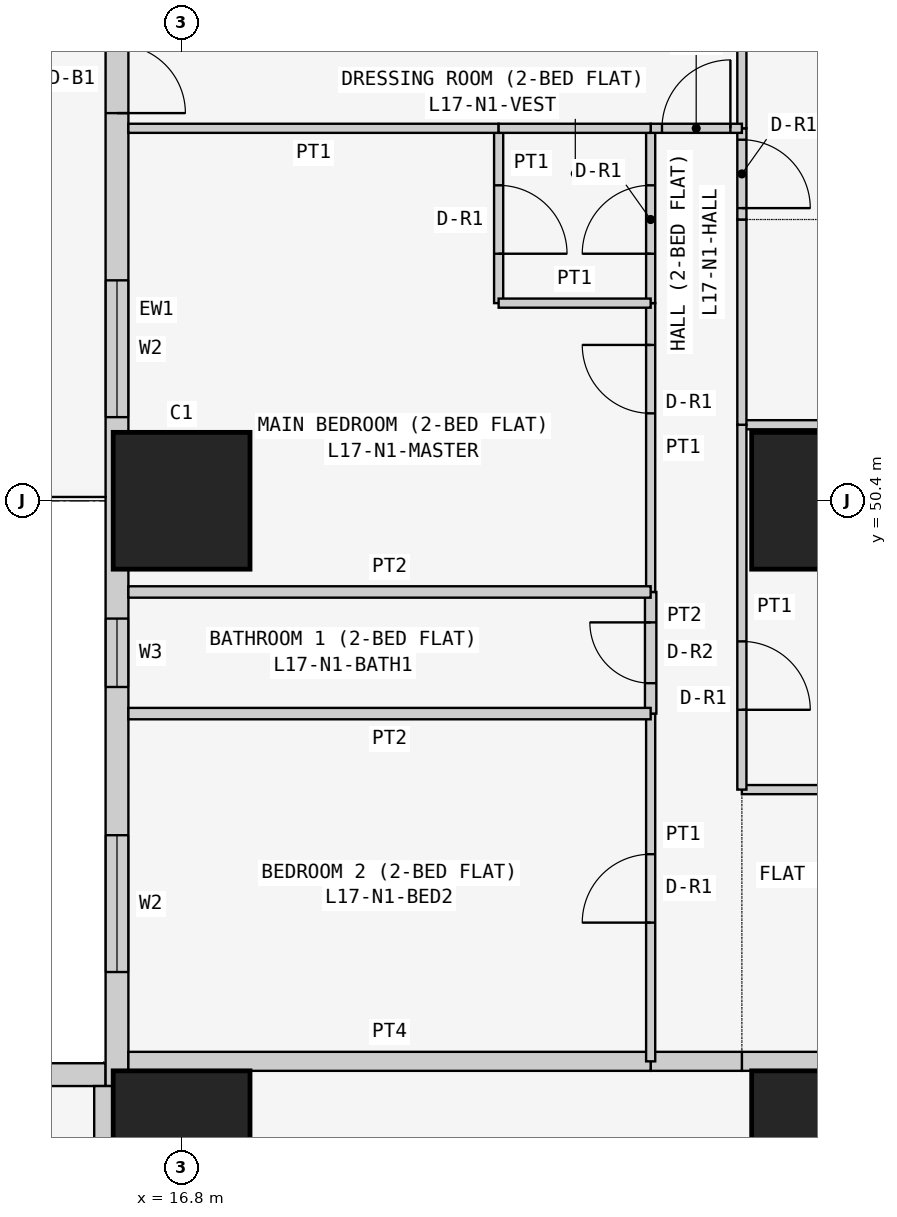
"""IFC4 building model, lengths in metres.
Left out: names, types, materials, properties, quantities, classifications, styles, units other than length and angle.
Written with IfcOpenShell. Run it as: python <this file> out.ifc"""

import sys

from ifc_helpers import new_model, si_unit, direction, frame, frame_2d, origin, origin_2d, place, context, subcontext, project, spatial, rectangle, extrude, element, fill, save


model = new_model("IFC4")
c1 = context("Model", 3, precision=1e-05, world=origin(), true_north=direction((0.0, 1.0)))
c2 = subcontext(c1, "Body", "Model", "MODEL_VIEW")
j1 = project(units=[si_unit("LENGTHUNIT", "METRE"), si_unit("PLANEANGLEUNIT", "RADIAN")], contexts=[c1])
p1 = place(None, origin())
s1 = spatial("IfcSite", under=j1, at=p1, CompositionType="ELEMENT")
p2 = place(p1, origin())
s2 = spatial("IfcBuilding", under=s1, at=p2, CompositionType="ELEMENT")
p3 = place(p2, frame((0.0, 0.0, 70.5)))
s3 = spatial("IfcBuildingStorey", under=s2, at=p3, CompositionType="ELEMENT", Elevation=70.5)
for number, where, z_axis, x_axis in (
    (1, (16.8, 42.0, 0.0), (0.0, 0.0, 1.0), (1.0, 0.0, 0.0)),
    (2, (16.8, 50.4, 0.0), (0.0, 0.0, 1.0), (1.0, 0.0, 0.0)),
    (3, (25.2, 42.0, 0.0), (0.0, 0.0, 1.0), (1.0, 0.0, 0.0)),
    (4, (25.2, 50.4, 0.0), (0.0, 0.0, 1.0), (1.0, 0.0, 0.0)),
):
    element("IfcColumn", number, at=place(p3, frame(where, z_axis=z_axis, x_axis=x_axis)), inside=s3, PredefinedType="COLUMN", context=c2, shape_type="SweptSolid", body=[
        extrude(rectangle(XDim=1.8, YDim=1.8, at=origin_2d()), origin(), (0.0, 0.0, 1.0), 3.6),
    ])
p4 = place(p3, frame((15.8, 42.85, 0.0), z_axis=(0.0, 0.0, 1.0), x_axis=(-1.0, 0.0, 0.0)))
e5 = element("IfcWall", 5, at=p4, inside=s3, PredefinedType="SOLIDWALL", context=c2, shape_type="SweptSolid", body=[
    extrude(rectangle(XDim=15.4, YDim=0.3, at=frame_2d((7.7, 0.0))), origin(), (0.0, 0.0, 1.0), 3.45),
])
p5 = place(p4, frame((1.2, 0.0, 0.9)))
e6 = element("IfcOpeningElement", 6, at=p5, cuts=e5, PredefinedType="OPENING", context=c2, shape_type="SweptSolid", body=[
    extrude(rectangle(XDim=1.8, YDim=1.5, at=frame_2d((0.9, 0.75))), frame((0.0, 0.16, 0.0), z_axis=(0.0, -1.0, 0.0), x_axis=(1.0, 0.0, 0.0)), (0.0, 0.0, 1.0), 0.32),
])
p6 = place(p4, frame((4.95, 0.0, 1.5)))
e7 = element("IfcOpeningElement", 7, at=p6, cuts=e5, PredefinedType="OPENING", context=c2, shape_type="SweptSolid", body=[
    extrude(rectangle(XDim=0.9, YDim=0.7, at=frame_2d((0.45, 0.35))), frame((0.0, 0.16, 0.0), z_axis=(0.0, -1.0, 0.0), x_axis=(1.0, 0.0, 0.0)), (0.0, 0.0, 1.0), 0.32),
])
p7 = place(p4, frame((8.5, 0.0, 0.9)))
e8 = element("IfcOpeningElement", 8, at=p7, cuts=e5, PredefinedType="OPENING", context=c2, shape_type="SweptSolid", body=[
    extrude(rectangle(XDim=1.8, YDim=1.5, at=frame_2d((0.9, 0.75))), frame((0.0, 0.16, 0.0), z_axis=(0.0, -1.0, 0.0), x_axis=(1.0, 0.0, 0.0)), (0.0, 0.0, 1.0), 0.32),
])
p8 = place(p4, frame((12.5, 0.0, 0.0)))
e9 = element("IfcOpeningElement", 9, at=p8, cuts=e5, PredefinedType="OPENING", context=c2, shape_type="SweptSolid", body=[
    extrude(rectangle(XDim=0.9, YDim=2.4, at=frame_2d((0.45, 1.2))), frame((0.0, 0.16, 0.0), z_axis=(0.0, -1.0, 0.0), x_axis=(1.0, 0.0, 0.0)), (0.0, 0.0, 1.0), 0.32),
])
p9 = place(p4, frame((13.5, 0.0, 0.9)))
e10 = element("IfcOpeningElement", 10, at=p9, cuts=e5, PredefinedType="OPENING", context=c2, shape_type="SweptSolid", body=[
    extrude(rectangle(XDim=1.2, YDim=1.5, at=frame_2d((0.6, 0.75))), frame((0.0, 0.16, 0.0), z_axis=(0.0, -1.0, 0.0), x_axis=(1.0, 0.0, 0.0)), (0.0, 0.0, 1.0), 0.32),
])
p10 = place(p3, frame((15.95, 58.4, 0.0), z_axis=(0.0, 0.0, 1.0), x_axis=(0.0, -1.0, 0.0)))
e11 = element("IfcWall", 11, at=p10, inside=s3, PredefinedType="SOLIDWALL", context=c2, shape_type="SweptSolid", body=[
    extrude(rectangle(XDim=15.7, YDim=0.3, at=frame_2d((7.85, 0.0))), origin(), (0.0, 0.0, 1.0), 3.45),
])
p11 = place(p10, frame((12.4, 0.0, 0.9)))
e12 = element("IfcOpeningElement", 12, at=p11, cuts=e11, PredefinedType="OPENING", context=c2, shape_type="SweptSolid", body=[
    extrude(rectangle(XDim=1.8, YDim=1.5, at=frame_2d((0.9, 0.75))), frame((0.0, 0.16, 0.0), z_axis=(0.0, -1.0, 0.0), x_axis=(1.0, 0.0, 0.0)), (0.0, 0.0, 1.0), 0.32),
])
p12 = place(p10, frame((9.55, 0.0, 1.5)))
e13 = element("IfcOpeningElement", 13, at=p12, cuts=e11, PredefinedType="OPENING", context=c2, shape_type="SweptSolid", body=[
    extrude(rectangle(XDim=0.9, YDim=0.7, at=frame_2d((0.45, 0.35))), frame((0.0, 0.16, 0.0), z_axis=(0.0, -1.0, 0.0), x_axis=(1.0, 0.0, 0.0)), (0.0, 0.0, 1.0), 0.32),
])
p13 = place(p10, frame((5.1, 0.0, 0.9)))
e14 = element("IfcOpeningElement", 14, at=p13, cuts=e11, PredefinedType="OPENING", context=c2, shape_type="SweptSolid", body=[
    extrude(rectangle(XDim=1.8, YDim=1.5, at=frame_2d((0.9, 0.75))), frame((0.0, 0.16, 0.0), z_axis=(0.0, -1.0, 0.0), x_axis=(1.0, 0.0, 0.0)), (0.0, 0.0, 1.0), 0.32),
])
p14 = place(p10, frame((2.0, 0.0, 0.0)))
e15 = element("IfcOpeningElement", 15, at=p14, cuts=e11, PredefinedType="OPENING", context=c2, shape_type="SweptSolid", body=[
    extrude(rectangle(XDim=0.9, YDim=2.4, at=frame_2d((0.45, 1.2))), frame((0.0, 0.16, 0.0), z_axis=(0.0, -1.0, 0.0), x_axis=(1.0, 0.0, 0.0)), (0.0, 0.0, 1.0), 0.32),
])
p15 = place(p10, frame((0.7, 0.0, 0.9)))
e16 = element("IfcOpeningElement", 16, at=p15, cuts=e11, PredefinedType="OPENING", context=c2, shape_type="SweptSolid", body=[
    extrude(rectangle(XDim=1.2, YDim=1.5, at=frame_2d((0.6, 0.75))), frame((0.0, 0.16, 0.0), z_axis=(0.0, -1.0, 0.0), x_axis=(1.0, 0.0, 0.0)), (0.0, 0.0, 1.0), 0.32),
])
p16 = place(p3, frame((24.171, 43.025, 0.0), z_axis=(0.0, 0.0, 1.0), x_axis=(1.0, 0.0, 0.0)))
e17 = element("IfcWall", 17, at=p16, inside=s3, PredefinedType="PARTITIONING", context=c2, shape_type="SweptSolid", body=[
    extrude(rectangle(XDim=5.229, YDim=0.25, at=frame_2d((2.615, 0.0))), origin(), (0.0, 0.0, 1.0), 3.45),
])
p17 = place(p16, frame((2.129, 0.0, 0.0)))
e18 = element("IfcOpeningElement", 18, at=p17, cuts=e17, PredefinedType="OPENING", context=c2, shape_type="SweptSolid", body=[
    extrude(rectangle(XDim=1.0, YDim=2.1, at=frame_2d((0.5, 1.05))), frame((0.0, 0.135, 0.0), z_axis=(0.0, -1.0, 0.0), x_axis=(1.0, 0.0, 0.0)), (0.0, 0.0, 1.0), 0.27),
])
p18 = place(p3, frame((22.971, 43.025, 0.0), z_axis=(0.0, 0.0, 1.0), x_axis=(1.0, 0.0, 0.0)))
e19 = element("IfcWall", 19, at=p18, inside=s3, PredefinedType="PARTITIONING", context=c2, shape_type="SweptSolid", body=[
    extrude(rectangle(XDim=1.2, YDim=0.25, at=frame_2d((0.6, 0.0))), origin(), (0.0, 0.0, 1.0), 3.45),
])
p19 = place(p3, frame((16.1, 43.025, 0.0), z_axis=(0.0, 0.0, 1.0), x_axis=(1.0, 0.0, 0.0)))
e20 = element("IfcWall", 20, at=p19, inside=s3, PredefinedType="PARTITIONING", context=c2, shape_type="SweptSolid", body=[
    extrude(rectangle(XDim=6.871, YDim=0.25, at=frame_2d((3.436, 0.0))), origin(), (0.0, 0.0, 1.0), 3.45),
])
p20 = place(p3, frame((15.775, 36.229, 0.0), z_axis=(0.0, 0.0, 1.0), x_axis=(0.0, 1.0, 0.0)))
e21 = element("IfcWall", 21, at=p20, inside=s3, PredefinedType="PARTITIONING", context=c2, shape_type="SweptSolid", body=[
    extrude(rectangle(XDim=6.471, YDim=0.25, at=frame_2d((3.235, 0.0))), origin(), (0.0, 0.0, 1.0), 3.45),
])
for number, where, z_axis, x_axis in (
    (22, (29.4, 46.6, 0.0), (0.0, 0.0, 1.0), (-1.0, 0.0, 0.0)),
    (23, (29.4, 51.4, 0.0), (0.0, 0.0, 1.0), (-1.0, 0.0, 0.0)),
):
    element("IfcWall", number, at=place(p3, frame(where, z_axis=z_axis, x_axis=x_axis)), inside=s3, PredefinedType="PARTITIONING", context=c2, shape_type="SweptSolid", body=[
        extrude(rectangle(XDim=5.229, YDim=0.12, at=frame_2d((2.615, 0.0))), origin(), (0.0, 0.0, 1.0), 3.45),
    ])
p21 = place(p3, frame((24.171, 51.4, 0.0), z_axis=(0.0, 0.0, 1.0), x_axis=(0.0, -1.0, 0.0)))
e24 = element("IfcWall", 24, at=p21, inside=s3, PredefinedType="PARTITIONING", context=c2, shape_type="SweptSolid", body=[
    extrude(rectangle(XDim=4.8, YDim=0.12, at=frame_2d((2.4, 0.0))), origin(), (0.0, 0.0, 1.0), 3.45),
])
p22 = place(p21, frame((2.85, 0.0, 0.0)))
e25 = element("IfcOpeningElement", 25, at=p22, cuts=e24, PredefinedType="OPENING", context=c2, shape_type="SweptSolid", body=[
    extrude(rectangle(XDim=0.9, YDim=2.1, at=frame_2d((0.45, 1.05))), frame((0.0, 0.07, 0.0), z_axis=(0.0, -1.0, 0.0), x_axis=(1.0, 0.0, 0.0)), (0.0, 0.0, 1.0), 0.14),
])
p23 = place(p3, frame((24.171, 54.1, 0.0), z_axis=(0.0, 0.0, 1.0), x_axis=(0.0, -1.0, 0.0)))
e26 = element("IfcWall", 26, at=p23, inside=s3, PredefinedType="PARTITIONING", context=c2, shape_type="SweptSolid", body=[
    extrude(rectangle(XDim=2.7, YDim=0.12, at=frame_2d((1.35, 0.0))), origin(), (0.0, 0.0, 1.0), 3.45),
])
p24 = place(p3, frame((24.171, 55.3, 0.0), z_axis=(0.0, 0.0, 1.0), x_axis=(0.0, -1.0, 0.0)))
e27 = element("IfcWall", 27, at=p24, inside=s3, PredefinedType="PARTITIONING", context=c2, shape_type="SweptSolid", body=[
    extrude(rectangle(XDim=1.2, YDim=0.12, at=frame_2d((0.6, 0.0))), origin(), (0.0, 0.0, 1.0), 3.45),
])
p25 = place(p24, frame((0.15, 0.0, 0.0)))
e28 = element("IfcOpeningElement", 28, at=p25, cuts=e27, PredefinedType="OPENING", context=c2, shape_type="SweptSolid", body=[
    extrude(rectangle(XDim=0.9, YDim=2.1, at=frame_2d((0.45, 1.05))), frame((0.0, 0.07, 0.0), z_axis=(0.0, -1.0, 0.0), x_axis=(1.0, 0.0, 0.0)), (0.0, 0.0, 1.0), 0.14),
])
p26 = place(p3, frame((24.171, 59.45, 0.0), z_axis=(0.0, 0.0, 1.0), x_axis=(0.0, -1.0, 0.0)))
e29 = element("IfcWall", 29, at=p26, inside=s3, PredefinedType="PARTITIONING", context=c2, shape_type="SweptSolid", body=[
    extrude(rectangle(XDim=4.15, YDim=0.12, at=frame_2d((2.075, 0.0))), origin(), (0.0, 0.0, 1.0), 3.45),
])
p27 = place(p3, frame((22.971, 47.6, 0.0), z_axis=(0.0, 0.0, 1.0), x_axis=(0.0, -1.0, 0.0)))
e30 = element("IfcWall", 30, at=p27, inside=s3, PredefinedType="PARTITIONING", context=c2, shape_type="SweptSolid", body=[
    extrude(rectangle(XDim=4.575, YDim=0.12, at=frame_2d((2.288, 0.0))), origin(), (0.0, 0.0, 1.0), 3.45),
])
p28 = place(p27, frame((1.85, 0.0, 0.0)))
e31 = element("IfcOpeningElement", 31, at=p28, cuts=e30, PredefinedType="OPENING", context=c2, shape_type="SweptSolid", body=[
    extrude(rectangle(XDim=0.9, YDim=2.1, at=frame_2d((0.45, 1.05))), frame((0.0, 0.07, 0.0), z_axis=(0.0, -1.0, 0.0), x_axis=(1.0, 0.0, 0.0)), (0.0, 0.0, 1.0), 0.14),
])
p29 = place(p3, frame((22.971, 49.2, 0.0), z_axis=(0.0, 0.0, 1.0), x_axis=(0.0, -1.0, 0.0)))
e32 = element("IfcWall", 32, at=p29, inside=s3, PredefinedType="PARTITIONING", context=c2, shape_type="SweptSolid", body=[
    extrude(rectangle(XDim=1.6, YDim=0.15, at=frame_2d((0.8, 0.0))), origin(), (0.0, 0.0, 1.0), 3.45),
])
p30 = place(p29, frame((0.4, 0.0, 0.0)))
e33 = element("IfcOpeningElement", 33, at=p30, cuts=e32, PredefinedType="OPENING", context=c2, shape_type="SweptSolid", body=[
    extrude(rectangle(XDim=0.8, YDim=2.1, at=frame_2d((0.4, 1.05))), frame((0.0, 0.085, 0.0), z_axis=(0.0, -1.0, 0.0), x_axis=(1.0, 0.0, 0.0)), (0.0, 0.0, 1.0), 0.17),
])
p31 = place(p3, frame((22.971, 53.0, 0.0), z_axis=(0.0, 0.0, 1.0), x_axis=(0.0, -1.0, 0.0)))
e34 = element("IfcWall", 34, at=p31, inside=s3, PredefinedType="PARTITIONING", context=c2, shape_type="SweptSolid", body=[
    extrude(rectangle(XDim=3.8, YDim=0.12, at=frame_2d((1.9, 0.0))), origin(), (0.0, 0.0, 1.0), 3.45),
])
p32 = place(p31, frame((0.55, 0.0, 0.0)))
e35 = element("IfcOpeningElement", 35, at=p32, cuts=e34, PredefinedType="OPENING", context=c2, shape_type="SweptSolid", body=[
    extrude(rectangle(XDim=0.9, YDim=2.1, at=frame_2d((0.45, 1.05))), frame((0.0, 0.07, 0.0), z_axis=(0.0, -1.0, 0.0), x_axis=(1.0, 0.0, 0.0)), (0.0, 0.0, 1.0), 0.14),
])
p33 = place(p3, frame((22.971, 55.3, 0.0), z_axis=(0.0, 0.0, 1.0), x_axis=(0.0, -1.0, 0.0)))
e36 = element("IfcWall", 36, at=p33, inside=s3, PredefinedType="PARTITIONING", context=c2, shape_type="SweptSolid", body=[
    extrude(rectangle(XDim=2.3, YDim=0.12, at=frame_2d((1.15, 0.0))), origin(), (0.0, 0.0, 1.0), 3.45),
])
p34 = place(p33, frame((0.75, 0.0, 0.0)))
e37 = element("IfcOpeningElement", 37, at=p34, cuts=e36, PredefinedType="OPENING", context=c2, shape_type="SweptSolid", body=[
    extrude(rectangle(XDim=0.9, YDim=2.1, at=frame_2d((0.45, 1.05))), frame((0.0, 0.07, 0.0), z_axis=(0.0, -1.0, 0.0), x_axis=(1.0, 0.0, 0.0)), (0.0, 0.0, 1.0), 0.14),
])
p35 = place(p3, frame((24.171, 55.3, 0.0), z_axis=(0.0, 0.0, 1.0), x_axis=(-1.0, 0.0, 0.0)))
e38 = element("IfcWall", 38, at=p35, inside=s3, PredefinedType="PARTITIONING", context=c2, shape_type="SweptSolid", body=[
    extrude(rectangle(XDim=1.2, YDim=0.12, at=frame_2d((0.6, 0.0))), origin(), (0.0, 0.0, 1.0), 3.45),
])
p36 = place(p35, frame((0.151, 0.0, 0.0)))
e39 = element("IfcOpeningElement", 39, at=p36, cuts=e38, PredefinedType="OPENING", context=c2, shape_type="SweptSolid", body=[
    extrude(rectangle(XDim=0.9, YDim=2.1, at=frame_2d((0.45, 1.05))), frame((0.0, 0.07, 0.0), z_axis=(0.0, -1.0, 0.0), x_axis=(1.0, 0.0, 0.0)), (0.0, 0.0, 1.0), 0.14),
])
for number, where, z_axis, x_axis in (
    (40, (22.971, 47.6, 0.0), (0.0, 0.0, 1.0), (-1.0, 0.0, 0.0)),
    (41, (22.971, 49.2, 0.0), (0.0, 0.0, 1.0), (-1.0, 0.0, 0.0)),
):
    element("IfcWall", number, at=place(p3, frame(where, z_axis=z_axis, x_axis=x_axis)), inside=s3, PredefinedType="PARTITIONING", context=c2, shape_type="SweptSolid", body=[
        extrude(rectangle(XDim=6.871, YDim=0.15, at=frame_2d((3.436, 0.0))), origin(), (0.0, 0.0, 1.0), 3.45),
    ])
p37 = place(p3, frame((20.971, 55.3, 0.0), z_axis=(0.0, 0.0, 1.0), x_axis=(0.0, -1.0, 0.0)))
e42 = element("IfcWall", 42, at=p37, inside=s3, PredefinedType="PARTITIONING", context=c2, shape_type="SweptSolid", body=[
    extrude(rectangle(XDim=2.3, YDim=0.12, at=frame_2d((1.15, 0.0))), origin(), (0.0, 0.0, 1.0), 2.848),
])
p38 = place(p37, frame((0.75, 0.0, 0.0)))
e43 = element("IfcOpeningElement", 43, at=p38, cuts=e42, PredefinedType="OPENING", context=c2, shape_type="SweptSolid", body=[
    extrude(rectangle(XDim=0.9, YDim=2.1, at=frame_2d((0.45, 1.05))), frame((0.0, 0.07, 0.0), z_axis=(0.0, -1.0, 0.0), x_axis=(1.0, 0.0, 0.0)), (0.0, 0.0, 1.0), 0.14),
])
p39 = place(p3, frame((20.971, 53.0, 0.0), z_axis=(0.0, 0.0, 1.0), x_axis=(1.0, 0.0, 0.0)))
e44 = element("IfcWall", 44, at=p39, inside=s3, PredefinedType="PARTITIONING", context=c2, shape_type="SweptSolid", body=[
    extrude(rectangle(XDim=2.0, YDim=0.12, at=frame_2d((1.0, 0.0))), origin(), (0.0, 0.0, 1.0), 3.45),
])
p40 = place(p3, frame((16.1, 55.3, 0.0), z_axis=(0.0, 0.0, 1.0), x_axis=(1.0, 0.0, 0.0)))
e45 = element("IfcWall", 45, at=p40, inside=s3, PredefinedType="PARTITIONING", context=c2, shape_type="SweptSolid", body=[
    extrude(rectangle(XDim=4.871, YDim=0.12, at=frame_2d((2.436, 0.0))), origin(), (0.0, 0.0, 1.0), 3.45),
])
p41 = place(p3, frame((22.971, 55.3, 0.0), z_axis=(0.0, 0.0, 1.0), x_axis=(-1.0, 0.0, 0.0)))
e46 = element("IfcWall", 46, at=p41, inside=s3, PredefinedType="PARTITIONING", context=c2, shape_type="SweptSolid", body=[
    extrude(rectangle(XDim=2.0, YDim=0.12, at=frame_2d((1.0, 0.0))), origin(), (0.0, 0.0, 1.0), 3.45),
])
p42 = place(p11, origin())
e47 = element("IfcWindow", 47, at=p42, inside=s3, PartitioningType="SINGLE_PANEL", PredefinedType="WINDOW", context=c2, shape_type="SweptSolid", body=[
    extrude(rectangle(XDim=1.8, YDim=1.5, at=frame_2d((0.9, 0.75))), frame((0.0, 0.03, 0.0), z_axis=(0.0, -1.0, 0.0), x_axis=(1.0, 0.0, 0.0)), (0.0, 0.0, 1.0), 0.06),
])
fill(e12, e47)
p43 = place(p12, origin())
e48 = element("IfcWindow", 48, at=p43, inside=s3, PartitioningType="SINGLE_PANEL", PredefinedType="WINDOW", context=c2, shape_type="SweptSolid", body=[
    extrude(rectangle(XDim=0.9, YDim=0.7, at=frame_2d((0.45, 0.35))), frame((0.0, 0.03, 0.0), z_axis=(0.0, -1.0, 0.0), x_axis=(1.0, 0.0, 0.0)), (0.0, 0.0, 1.0), 0.06),
])
fill(e13, e48)
p44 = place(p13, origin())
e49 = element("IfcWindow", 49, at=p44, inside=s3, PartitioningType="SINGLE_PANEL", PredefinedType="WINDOW", context=c2, shape_type="SweptSolid", body=[
    extrude(rectangle(XDim=1.8, YDim=1.5, at=frame_2d((0.9, 0.75))), frame((0.0, 0.03, 0.0), z_axis=(0.0, -1.0, 0.0), x_axis=(1.0, 0.0, 0.0)), (0.0, 0.0, 1.0), 0.06),
])
fill(e14, e49)
p45 = place(p14, origin())
e50 = element("IfcDoor", 50, at=p45, inside=s3, OperationType="SINGLE_SWING_RIGHT", PredefinedType="DOOR", context=c2, shape_type="SweptSolid", body=[
    extrude(rectangle(XDim=0.9, YDim=2.4, at=frame_2d((0.45, 1.2))), frame((0.0, 0.025, 0.0), z_axis=(0.0, -1.0, 0.0), x_axis=(1.0, 0.0, 0.0)), (0.0, 0.0, 1.0), 0.05),
])
fill(e15, e50)
p46 = place(p22, origin())
e51 = element("IfcDoor", 51, at=p46, inside=s3, OperationType="SINGLE_SWING_RIGHT", PredefinedType="DOOR", context=c2, shape_type="SweptSolid", body=[
    extrude(rectangle(XDim=0.9, YDim=2.1, at=frame_2d((0.45, 1.05))), frame((0.0, 0.025, 0.0), z_axis=(0.0, -1.0, 0.0), x_axis=(1.0, 0.0, 0.0)), (0.0, 0.0, 1.0), 0.05),
])
fill(e25, e51)
p47 = place(p25, origin())
e52 = element("IfcDoor", 52, at=p47, inside=s3, OperationType="SINGLE_SWING_RIGHT", PredefinedType="DOOR", context=c2, shape_type="SweptSolid", body=[
    extrude(rectangle(XDim=0.9, YDim=2.1, at=frame_2d((0.45, 1.05))), frame((0.0, 0.025, 0.0), z_axis=(0.0, -1.0, 0.0), x_axis=(1.0, 0.0, 0.0)), (0.0, 0.0, 1.0), 0.05),
])
fill(e28, e52)
p48 = place(p28, frame((0.9, 0.0, 0.0), z_axis=(0.0, 0.0, 1.0), x_axis=(-1.0, 0.0, 0.0)))
e53 = element("IfcDoor", 53, at=p48, inside=s3, OperationType="SINGLE_SWING_LEFT", PredefinedType="DOOR", context=c2, shape_type="SweptSolid", body=[
    extrude(rectangle(XDim=0.9, YDim=2.1, at=frame_2d((0.45, 1.05))), frame((0.0, 0.025, 0.0), z_axis=(0.0, -1.0, 0.0), x_axis=(1.0, 0.0, 0.0)), (0.0, 0.0, 1.0), 0.05),
])
fill(e31, e53)
p49 = place(p30, frame((0.8, 0.0, 0.0), z_axis=(0.0, 0.0, 1.0), x_axis=(-1.0, 0.0, 0.0)))
e54 = element("IfcDoor", 54, at=p49, inside=s3, OperationType="SINGLE_SWING_RIGHT", PredefinedType="DOOR", context=c2, shape_type="SweptSolid", body=[
    extrude(rectangle(XDim=0.8, YDim=2.1, at=frame_2d((0.4, 1.05))), frame((0.0, 0.025, 0.0), z_axis=(0.0, -1.0, 0.0), x_axis=(1.0, 0.0, 0.0)), (0.0, 0.0, 1.0), 0.05),
])
fill(e33, e54)
p50 = place(p32, frame((0.9, 0.0, 0.0), z_axis=(0.0, 0.0, 1.0), x_axis=(-1.0, 0.0, 0.0)))
e55 = element("IfcDoor", 55, at=p50, inside=s3, OperationType="SINGLE_SWING_RIGHT", PredefinedType="DOOR", context=c2, shape_type="SweptSolid", body=[
    extrude(rectangle(XDim=0.9, YDim=2.1, at=frame_2d((0.45, 1.05))), frame((0.0, 0.025, 0.0), z_axis=(0.0, -1.0, 0.0), x_axis=(1.0, 0.0, 0.0)), (0.0, 0.0, 1.0), 0.05),
])
fill(e35, e55)
p51 = place(p34, frame((0.9, 0.0, 0.0), z_axis=(0.0, 0.0, 1.0), x_axis=(-1.0, 0.0, 0.0)))
e56 = element("IfcDoor", 56, at=p51, inside=s3, OperationType="SINGLE_SWING_LEFT", PredefinedType="DOOR", context=c2, shape_type="SweptSolid", body=[
    extrude(rectangle(XDim=0.9, YDim=2.1, at=frame_2d((0.45, 1.05))), frame((0.0, 0.025, 0.0), z_axis=(0.0, -1.0, 0.0), x_axis=(1.0, 0.0, 0.0)), (0.0, 0.0, 1.0), 0.05),
])
fill(e37, e56)
p52 = place(p38, origin())
e57 = element("IfcDoor", 57, at=p52, inside=s3, OperationType="SINGLE_SWING_RIGHT", PredefinedType="DOOR", context=c2, shape_type="SweptSolid", body=[
    extrude(rectangle(XDim=0.9, YDim=2.1, at=frame_2d((0.45, 1.05))), frame((0.0, 0.025, 0.0), z_axis=(0.0, -1.0, 0.0), x_axis=(1.0, 0.0, 0.0)), (0.0, 0.0, 1.0), 0.05),
])
fill(e43, e57)
p53 = place(p36, frame((0.9, 0.0, 0.0), z_axis=(0.0, 0.0, 1.0), x_axis=(-1.0, 0.0, 0.0)))
e58 = element("IfcDoor", 58, at=p53, inside=s3, OperationType="SINGLE_SWING_RIGHT", PredefinedType="DOOR", context=c2, shape_type="SweptSolid", body=[
    extrude(rectangle(XDim=0.9, YDim=2.1, at=frame_2d((0.45, 1.05))), frame((0.0, 0.025, 0.0), z_axis=(0.0, -1.0, 0.0), x_axis=(1.0, 0.0, 0.0)), (0.0, 0.0, 1.0), 0.05),
])
fill(e39, e58)
save(model, sys.argv[1])
